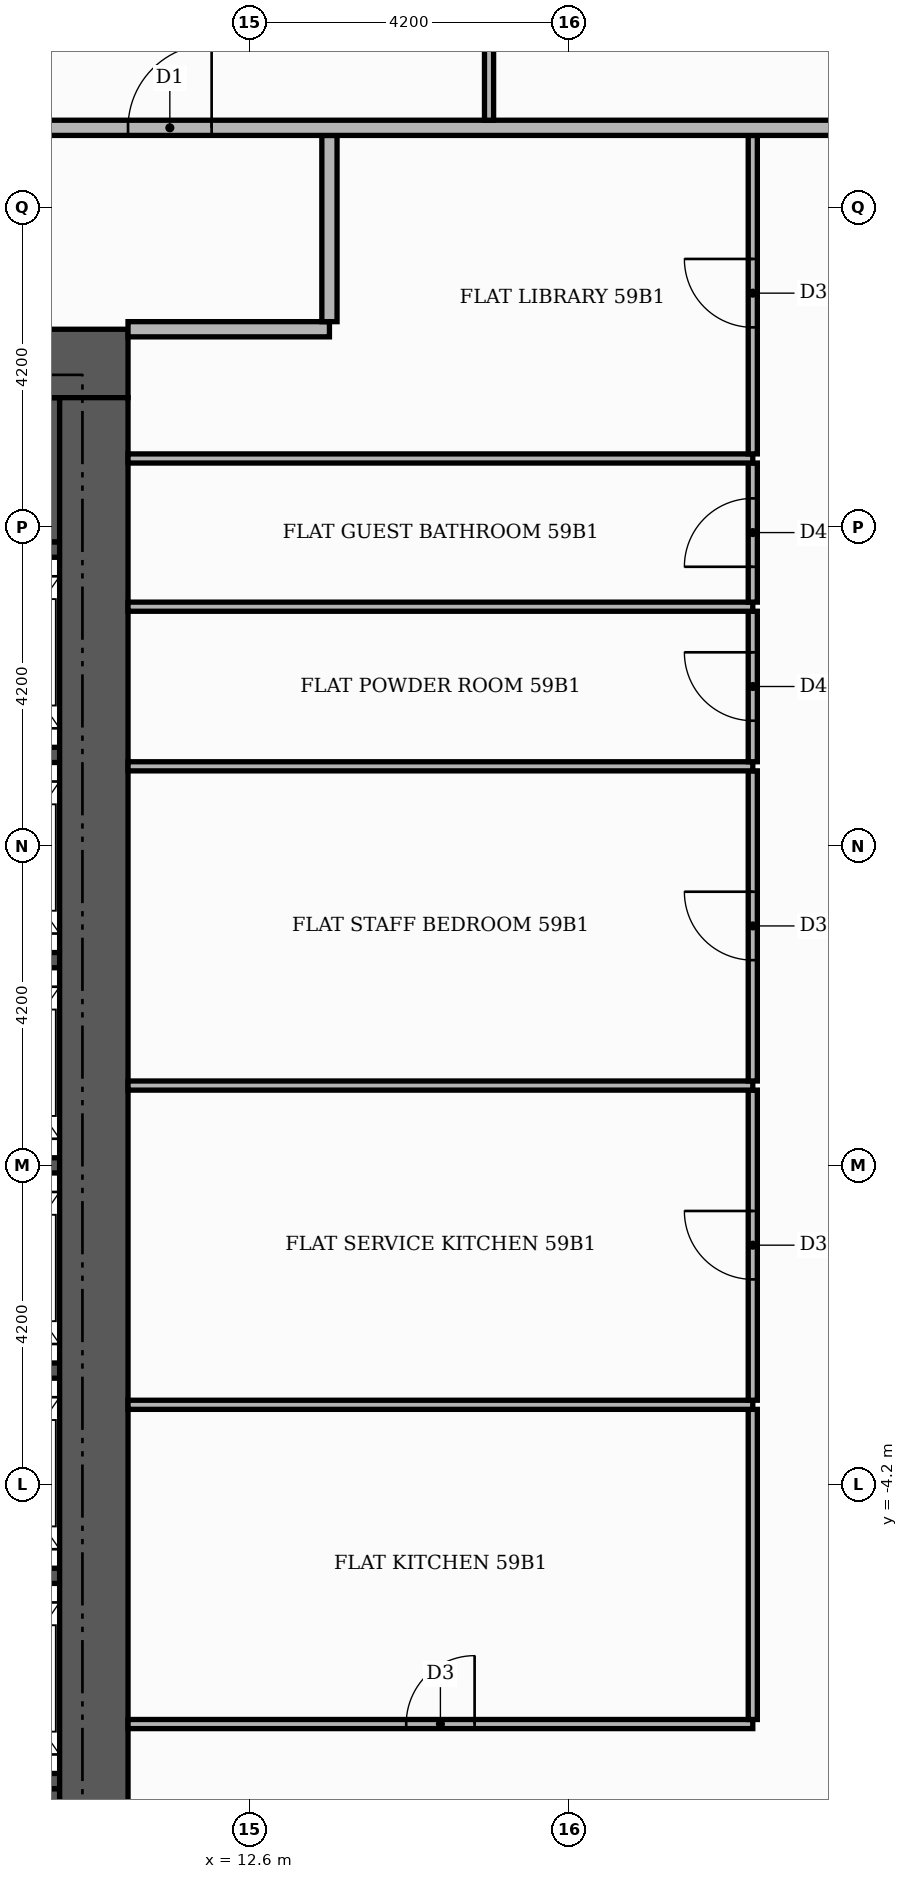
"""IFC4 building model, lengths in metres.
Left out: names, types, materials, properties, quantities, classifications, styles, units other than length and angle.
Written with IfcOpenShell. Run it as: python <this file> out.ifc"""

import sys

from ifc_helpers import new_model, si_unit, direction, frame, frame_2d, origin, place, context, subcontext, project, spatial, rectangle, extrude, element, fill, save


model = new_model("IFC4")
c1 = context("Model", 3, precision=1e-05, world=origin(), true_north=direction((0.0, 1.0)))
c2 = subcontext(c1, "Body", "Model", "MODEL_VIEW")
j1 = project(units=[si_unit("LENGTHUNIT", "METRE"), si_unit("PLANEANGLEUNIT", "RADIAN")], contexts=[c1])
p1 = place(None, origin())
s1 = spatial("IfcSite", under=j1, at=p1, CompositionType="ELEMENT")
p2 = place(p1, origin())
s2 = spatial("IfcBuilding", under=s1, at=p2, CompositionType="ELEMENT")
p3 = place(p2, frame((0.0, 0.0, 248.4)))
s3 = spatial("IfcBuildingStorey", under=s2, at=p3, CompositionType="ELEMENT", Elevation=248.4)
for number, where, z_axis, x_axis in (
    (1, (5.5, -9.15, 0.0), (0.0, 0.0, 1.0), (1.0, 0.0, 0.0)),
    (2, (5.5, 9.15, 0.0), (0.0, 0.0, 1.0), (1.0, 0.0, 0.0)),
):
    element("IfcWall", number, at=place(p3, frame(where, z_axis=z_axis, x_axis=x_axis)), inside=s3, PredefinedType="SHEAR", context=c2, shape_type="SweptSolid", body=[
        extrude(rectangle(XDim=4.6, YDim=1.9, at=frame_2d((2.3, 0.0))), origin(), (0.0, 0.0, 1.0), 3.48),
    ])
for number, where, z_axis, x_axis in (
    (3, (8.1, -8.1, 0.0), (0.0, 0.0, 1.0), (1.0, 0.0, 0.0)),
    (4, (8.1, -5.4, 0.0), (0.0, 0.0, 1.0), (1.0, 0.0, 0.0)),
    (5, (8.1, -2.7, 0.0), (0.0, 0.0, 1.0), (1.0, 0.0, 0.0)),
    (6, (8.1, 0.0, 0.0), (0.0, 0.0, 1.0), (1.0, 0.0, 0.0)),
    (7, (8.1, 2.7, 0.0), (0.0, 0.0, 1.0), (1.0, 0.0, 0.0)),
    (8, (8.1, 5.4, 0.0), (0.0, 0.0, 1.0), (1.0, 0.0, 0.0)),
    (9, (8.1, 8.1, 0.0), (0.0, 0.0, 1.0), (1.0, 0.0, 0.0)),
):
    element("IfcWall", number, at=place(p3, frame(where, z_axis=z_axis, x_axis=x_axis)), inside=s3, PredefinedType="SHEAR", context=c2, shape_type="SweptSolid", body=[
        extrude(rectangle(XDim=2.0, YDim=0.2, at=frame_2d((1.0, 0.0))), origin(), (0.0, 0.0, 1.0), 3.48),
    ])
p4 = place(p3, frame((-11.0, 10.55, 0.0), z_axis=(0.0, 0.0, 1.0), x_axis=(1.0, 0.0, 0.0)))
e10 = element("IfcWall", 10, at=p4, inside=s3, PredefinedType="SHEAR", context=c2, shape_type="SweptSolid", body=[
    extrude(rectangle(XDim=22.0, YDim=0.9, at=frame_2d((11.0, 0.0))), origin(), (0.0, 0.0, 1.0), 3.48),
])
p5 = place(p4, frame((13.3, 0.0, 0.0)))
e11 = element("IfcOpeningElement", 11, at=p5, cuts=e10, PredefinedType="OPENING", context=c2, shape_type="SweptSolid", body=[
    extrude(rectangle(XDim=1.8, YDim=2.2, at=frame_2d((0.9, 1.1))), frame((0.0, 0.46, 0.0), z_axis=(0.0, -1.0, 0.0), x_axis=(1.0, 0.0, 0.0)), (0.0, 0.0, 1.0), 0.92),
])
p6 = place(p3, frame((10.55, -10.1, 0.0), z_axis=(0.0, 0.0, 1.0), x_axis=(0.0, 1.0, 0.0)))
e12 = element("IfcWall", 12, at=p6, inside=s3, PredefinedType="SHEAR", context=c2, shape_type="SweptSolid", body=[
    extrude(rectangle(XDim=20.2, YDim=0.9, at=frame_2d((10.1, 0.0))), origin(), (0.0, 0.0, 1.0), 3.48),
])
p7 = place(p3, frame((11.0, -7.35, 0.0), z_axis=(0.0, 0.0, 1.0), x_axis=(1.0, 0.0, 0.0)))
e13 = element("IfcWall", 13, at=p7, inside=s3, PredefinedType="PARTITIONING", context=c2, shape_type="SweptSolid", body=[
    extrude(rectangle(XDim=8.22, YDim=0.12, at=frame_2d((4.11, 0.0))), origin(), (0.0, 0.0, 1.0), 3.48),
])
p8 = place(p7, frame((3.66, 0.0, 0.0)))
e14 = element("IfcOpeningElement", 14, at=p8, cuts=e13, PredefinedType="OPENING", context=c2, shape_type="SweptSolid", body=[
    extrude(rectangle(XDim=0.9, YDim=2.1, at=frame_2d((0.45, 1.05))), frame((0.0, 0.07, 0.0), z_axis=(0.0, -1.0, 0.0), x_axis=(1.0, 0.0, 0.0)), (0.0, 0.0, 1.0), 0.14),
])
p9 = place(p3, frame((19.22, -7.29, 0.0), z_axis=(0.0, 0.0, 1.0), x_axis=(0.0, 1.0, 0.0)))
e15 = element("IfcWall", 15, at=p9, inside=s3, PredefinedType="PARTITIONING", context=c2, shape_type="SweptSolid", body=[
    extrude(rectangle(XDim=4.08, YDim=0.12, at=frame_2d((2.04, 0.0))), origin(), (0.0, 0.0, 1.0), 3.48),
])
p10 = place(p3, frame((11.0, -3.15, 0.0), z_axis=(0.0, 0.0, 1.0), x_axis=(1.0, 0.0, 0.0)))
e16 = element("IfcWall", 16, at=p10, inside=s3, PredefinedType="PARTITIONING", context=c2, shape_type="SweptSolid", body=[
    extrude(rectangle(XDim=8.22, YDim=0.12, at=frame_2d((4.11, 0.0))), origin(), (0.0, 0.0, 1.0), 3.48),
])
p11 = place(p3, frame((19.22, -3.09, 0.0), z_axis=(0.0, 0.0, 1.0), x_axis=(0.0, 1.0, 0.0)))
e17 = element("IfcWall", 17, at=p11, inside=s3, PredefinedType="PARTITIONING", context=c2, shape_type="SweptSolid", body=[
    extrude(rectangle(XDim=4.08, YDim=0.12, at=frame_2d((2.04, 0.0))), origin(), (0.0, 0.0, 1.0), 3.48),
])
p12 = place(p11, frame((1.59, 0.0, 0.0)))
e18 = element("IfcOpeningElement", 18, at=p12, cuts=e17, PredefinedType="OPENING", context=c2, shape_type="SweptSolid", body=[
    extrude(rectangle(XDim=0.9, YDim=2.1, at=frame_2d((0.45, 1.05))), frame((0.0, 0.07, 0.0), z_axis=(0.0, -1.0, 0.0), x_axis=(1.0, 0.0, 0.0)), (0.0, 0.0, 1.0), 0.14),
])
p13 = place(p3, frame((11.0, 1.05, 0.0), z_axis=(0.0, 0.0, 1.0), x_axis=(1.0, 0.0, 0.0)))
e19 = element("IfcWall", 19, at=p13, inside=s3, PredefinedType="PARTITIONING", context=c2, shape_type="SweptSolid", body=[
    extrude(rectangle(XDim=8.22, YDim=0.12, at=frame_2d((4.11, 0.0))), origin(), (0.0, 0.0, 1.0), 3.48),
])
p14 = place(p3, frame((19.22, 1.11, 0.0), z_axis=(0.0, 0.0, 1.0), x_axis=(0.0, 1.0, 0.0)))
e20 = element("IfcWall", 20, at=p14, inside=s3, PredefinedType="PARTITIONING", context=c2, shape_type="SweptSolid", body=[
    extrude(rectangle(XDim=4.08, YDim=0.12, at=frame_2d((2.04, 0.0))), origin(), (0.0, 0.0, 1.0), 3.48),
])
p15 = place(p14, frame((1.59, 0.0, 0.0)))
e21 = element("IfcOpeningElement", 21, at=p15, cuts=e20, PredefinedType="OPENING", context=c2, shape_type="SweptSolid", body=[
    extrude(rectangle(XDim=0.9, YDim=2.1, at=frame_2d((0.45, 1.05))), frame((0.0, 0.07, 0.0), z_axis=(0.0, -1.0, 0.0), x_axis=(1.0, 0.0, 0.0)), (0.0, 0.0, 1.0), 0.14),
])
p16 = place(p3, frame((11.0, 5.25, 0.0), z_axis=(0.0, 0.0, 1.0), x_axis=(1.0, 0.0, 0.0)))
e22 = element("IfcWall", 22, at=p16, inside=s3, PredefinedType="PARTITIONING", context=c2, shape_type="SweptSolid", body=[
    extrude(rectangle(XDim=8.22, YDim=0.12, at=frame_2d((4.11, 0.0))), origin(), (0.0, 0.0, 1.0), 3.48),
])
p17 = place(p3, frame((19.22, 5.31, 0.0), z_axis=(0.0, 0.0, 1.0), x_axis=(0.0, 1.0, 0.0)))
e23 = element("IfcWall", 23, at=p17, inside=s3, PredefinedType="PARTITIONING", context=c2, shape_type="SweptSolid", body=[
    extrude(rectangle(XDim=1.98, YDim=0.12, at=frame_2d((0.99, 0.0))), origin(), (0.0, 0.0, 1.0), 3.48),
])
p18 = place(p17, frame((0.54, 0.0, 0.0)))
e24 = element("IfcOpeningElement", 24, at=p18, cuts=e23, PredefinedType="OPENING", context=c2, shape_type="SweptSolid", body=[
    extrude(rectangle(XDim=0.9, YDim=2.1, at=frame_2d((0.45, 1.05))), frame((0.0, 0.07, 0.0), z_axis=(0.0, -1.0, 0.0), x_axis=(1.0, 0.0, 0.0)), (0.0, 0.0, 1.0), 0.14),
])
p19 = place(p3, frame((11.0, 7.35, 0.0), z_axis=(0.0, 0.0, 1.0), x_axis=(1.0, 0.0, 0.0)))
e25 = element("IfcWall", 25, at=p19, inside=s3, PredefinedType="PARTITIONING", context=c2, shape_type="SweptSolid", body=[
    extrude(rectangle(XDim=8.22, YDim=0.12, at=frame_2d((4.11, 0.0))), origin(), (0.0, 0.0, 1.0), 3.48),
])
p20 = place(p3, frame((19.22, 7.41, 0.0), z_axis=(0.0, 0.0, 1.0), x_axis=(0.0, 1.0, 0.0)))
e26 = element("IfcWall", 26, at=p20, inside=s3, PredefinedType="PARTITIONING", context=c2, shape_type="SweptSolid", body=[
    extrude(rectangle(XDim=1.83, YDim=0.12, at=frame_2d((0.915, 0.0))), origin(), (0.0, 0.0, 1.0), 3.48),
])
p21 = place(p20, frame((0.465, 0.0, 0.0)))
e27 = element("IfcOpeningElement", 27, at=p21, cuts=e26, PredefinedType="OPENING", context=c2, shape_type="SweptSolid", body=[
    extrude(rectangle(XDim=0.9, YDim=2.1, at=frame_2d((0.45, 1.05))), frame((0.0, 0.07, 0.0), z_axis=(0.0, -1.0, 0.0), x_axis=(1.0, 0.0, 0.0)), (0.0, 0.0, 1.0), 0.14),
])
p22 = place(p3, frame((11.0, 9.3, 0.0), z_axis=(0.0, 0.0, 1.0), x_axis=(1.0, 0.0, 0.0)))
e28 = element("IfcWall", 28, at=p22, inside=s3, PredefinedType="PARTITIONING", context=c2, shape_type="SweptSolid", body=[
    extrude(rectangle(XDim=8.22, YDim=0.12, at=frame_2d((4.11, 0.0))), origin(), (0.0, 0.0, 1.0), 3.48),
])
p23 = place(p3, frame((19.22, 9.36, 0.0), z_axis=(0.0, 0.0, 1.0), x_axis=(0.0, 1.0, 0.0)))
e29 = element("IfcWall", 29, at=p23, inside=s3, PredefinedType="PARTITIONING", context=c2, shape_type="SweptSolid", body=[
    extrude(rectangle(XDim=4.19, YDim=0.12, at=frame_2d((2.095, 0.0))), origin(), (0.0, 0.0, 1.0), 3.48),
])
p24 = place(p23, frame((1.665, 0.0, 0.0)))
e30 = element("IfcOpeningElement", 30, at=p24, cuts=e29, PredefinedType="OPENING", context=c2, shape_type="SweptSolid", body=[
    extrude(rectangle(XDim=0.9, YDim=2.1, at=frame_2d((0.45, 1.05))), frame((0.0, 0.07, 0.0), z_axis=(0.0, -1.0, 0.0), x_axis=(1.0, 0.0, 0.0)), (0.0, 0.0, 1.0), 0.14),
])
p25 = place(p3, frame((11.0, 11.0, 0.0), z_axis=(0.0, 0.0, 1.0), x_axis=(1.0, 0.0, 0.0)))
e31 = element("IfcWall", 31, at=p25, inside=s3, PredefinedType="PARTITIONING", context=c2, shape_type="SweptSolid", body=[
    extrude(rectangle(XDim=2.65, YDim=0.2, at=frame_2d((1.325, 0.0))), origin(), (0.0, 0.0, 1.0), 3.48),
])
p26 = place(p3, frame((13.65, 11.1, 0.0), z_axis=(0.0, 0.0, 1.0), x_axis=(0.0, 1.0, 0.0)))
e32 = element("IfcWall", 32, at=p26, inside=s3, PredefinedType="PARTITIONING", context=c2, shape_type="SweptSolid", body=[
    extrude(rectangle(XDim=2.45, YDim=0.2, at=frame_2d((1.225, 0.0))), origin(), (0.0, 0.0, 1.0), 3.48),
])
p27 = place(p3, frame((-13.65, 13.65, 0.0), z_axis=(0.0, 0.0, 1.0), x_axis=(1.0, 0.0, 0.0)))
e33 = element("IfcWall", 33, at=p27, inside=s3, PredefinedType="PARTITIONING", context=c2, shape_type="SweptSolid", body=[
    extrude(rectangle(XDim=39.07, YDim=0.2, at=frame_2d((19.535, 0.0))), origin(), (0.0, 0.0, 1.0), 3.48),
])
p28 = place(p27, frame((24.65, 0.0, 0.0)))
e34 = element("IfcOpeningElement", 34, at=p28, cuts=e33, PredefinedType="OPENING", context=c2, shape_type="SweptSolid", body=[
    extrude(rectangle(XDim=1.1, YDim=2.4, at=frame_2d((0.55, 1.2))), frame((0.0, 0.11, 0.0), z_axis=(0.0, -1.0, 0.0), x_axis=(1.0, 0.0, 0.0)), (0.0, 0.0, 1.0), 0.22),
])
p29 = place(p27, frame((12.05, 0.0, 0.0)))
e35 = element("IfcOpeningElement", 35, at=p29, cuts=e33, PredefinedType="OPENING", context=c2, shape_type="SweptSolid", body=[
    extrude(rectangle(XDim=1.1, YDim=2.4, at=frame_2d((0.55, 1.2))), frame((0.0, 0.11, 0.0), z_axis=(0.0, -1.0, 0.0), x_axis=(1.0, 0.0, 0.0)), (0.0, 0.0, 1.0), 0.22),
])
p30 = place(p3, frame((15.75, 13.75, 0.0), z_axis=(0.0, 0.0, 1.0), x_axis=(0.0, 1.0, 0.0)))
e36 = element("IfcWall", 36, at=p30, inside=s3, PredefinedType="PARTITIONING", context=c2, shape_type="SweptSolid", body=[
    extrude(rectangle(XDim=6.01, YDim=0.12, at=frame_2d((3.005, 0.0))), origin(), (0.0, 0.0, 1.0), 3.48),
])
p31 = place(p30, frame((2.485, 0.0, 0.0)))
e37 = element("IfcOpeningElement", 37, at=p31, cuts=e36, PredefinedType="OPENING", context=c2, shape_type="SweptSolid", body=[
    extrude(rectangle(XDim=1.0, YDim=2.1, at=frame_2d((0.5, 1.05))), frame((0.0, 0.07, 0.0), z_axis=(0.0, -1.0, 0.0), x_axis=(1.0, 0.0, 0.0)), (0.0, 0.0, 1.0), 0.14),
])
p32 = place(p8, origin())
e38 = element("IfcDoor", 38, at=p32, inside=s3, OperationType="SINGLE_SWING_RIGHT", PredefinedType="DOOR", context=c2, shape_type="SweptSolid", body=[
    extrude(rectangle(XDim=0.9, YDim=2.1, at=frame_2d((0.45, 1.05))), frame((0.0, 0.025, 0.0), z_axis=(0.0, -1.0, 0.0), x_axis=(1.0, 0.0, 0.0)), (0.0, 0.0, 1.0), 0.05),
])
fill(e14, e38)
p33 = place(p12, origin())
e39 = element("IfcDoor", 39, at=p33, inside=s3, OperationType="SINGLE_SWING_RIGHT", PredefinedType="DOOR", context=c2, shape_type="SweptSolid", body=[
    extrude(rectangle(XDim=0.9, YDim=2.1, at=frame_2d((0.45, 1.05))), frame((0.0, 0.025, 0.0), z_axis=(0.0, -1.0, 0.0), x_axis=(1.0, 0.0, 0.0)), (0.0, 0.0, 1.0), 0.05),
])
fill(e18, e39)
p34 = place(p15, origin())
e40 = element("IfcDoor", 40, at=p34, inside=s3, OperationType="SINGLE_SWING_RIGHT", PredefinedType="DOOR", context=c2, shape_type="SweptSolid", body=[
    extrude(rectangle(XDim=0.9, YDim=2.1, at=frame_2d((0.45, 1.05))), frame((0.0, 0.025, 0.0), z_axis=(0.0, -1.0, 0.0), x_axis=(1.0, 0.0, 0.0)), (0.0, 0.0, 1.0), 0.05),
])
fill(e21, e40)
p35 = place(p18, origin())
e41 = element("IfcDoor", 41, at=p35, inside=s3, OperationType="SINGLE_SWING_RIGHT", PredefinedType="DOOR", context=c2, shape_type="SweptSolid", body=[
    extrude(rectangle(XDim=0.9, YDim=2.1, at=frame_2d((0.45, 1.05))), frame((0.0, 0.025, 0.0), z_axis=(0.0, -1.0, 0.0), x_axis=(1.0, 0.0, 0.0)), (0.0, 0.0, 1.0), 0.05),
])
fill(e24, e41)
p36 = place(p21, origin())
e42 = element("IfcDoor", 42, at=p36, inside=s3, OperationType="SINGLE_SWING_LEFT", PredefinedType="DOOR", context=c2, shape_type="SweptSolid", body=[
    extrude(rectangle(XDim=0.9, YDim=2.1, at=frame_2d((0.45, 1.05))), frame((0.0, 0.025, 0.0), z_axis=(0.0, -1.0, 0.0), x_axis=(1.0, 0.0, 0.0)), (0.0, 0.0, 1.0), 0.05),
])
fill(e27, e42)
p37 = place(p24, origin())
e43 = element("IfcDoor", 43, at=p37, inside=s3, OperationType="SINGLE_SWING_RIGHT", PredefinedType="DOOR", context=c2, shape_type="SweptSolid", body=[
    extrude(rectangle(XDim=0.9, YDim=2.1, at=frame_2d((0.45, 1.05))), frame((0.0, 0.025, 0.0), z_axis=(0.0, -1.0, 0.0), x_axis=(1.0, 0.0, 0.0)), (0.0, 0.0, 1.0), 0.05),
])
fill(e30, e43)
p38 = place(p28, origin())
e44 = element("IfcDoor", 44, at=p38, inside=s3, OperationType="SINGLE_SWING_RIGHT", PredefinedType="DOOR", context=c2, shape_type="SweptSolid", body=[
    extrude(rectangle(XDim=1.1, YDim=2.4, at=frame_2d((0.55, 1.2))), frame((0.0, 0.025, 0.0), z_axis=(0.0, -1.0, 0.0), x_axis=(1.0, 0.0, 0.0)), (0.0, 0.0, 1.0), 0.05),
])
fill(e34, e44)
save(model, sys.argv[1])
